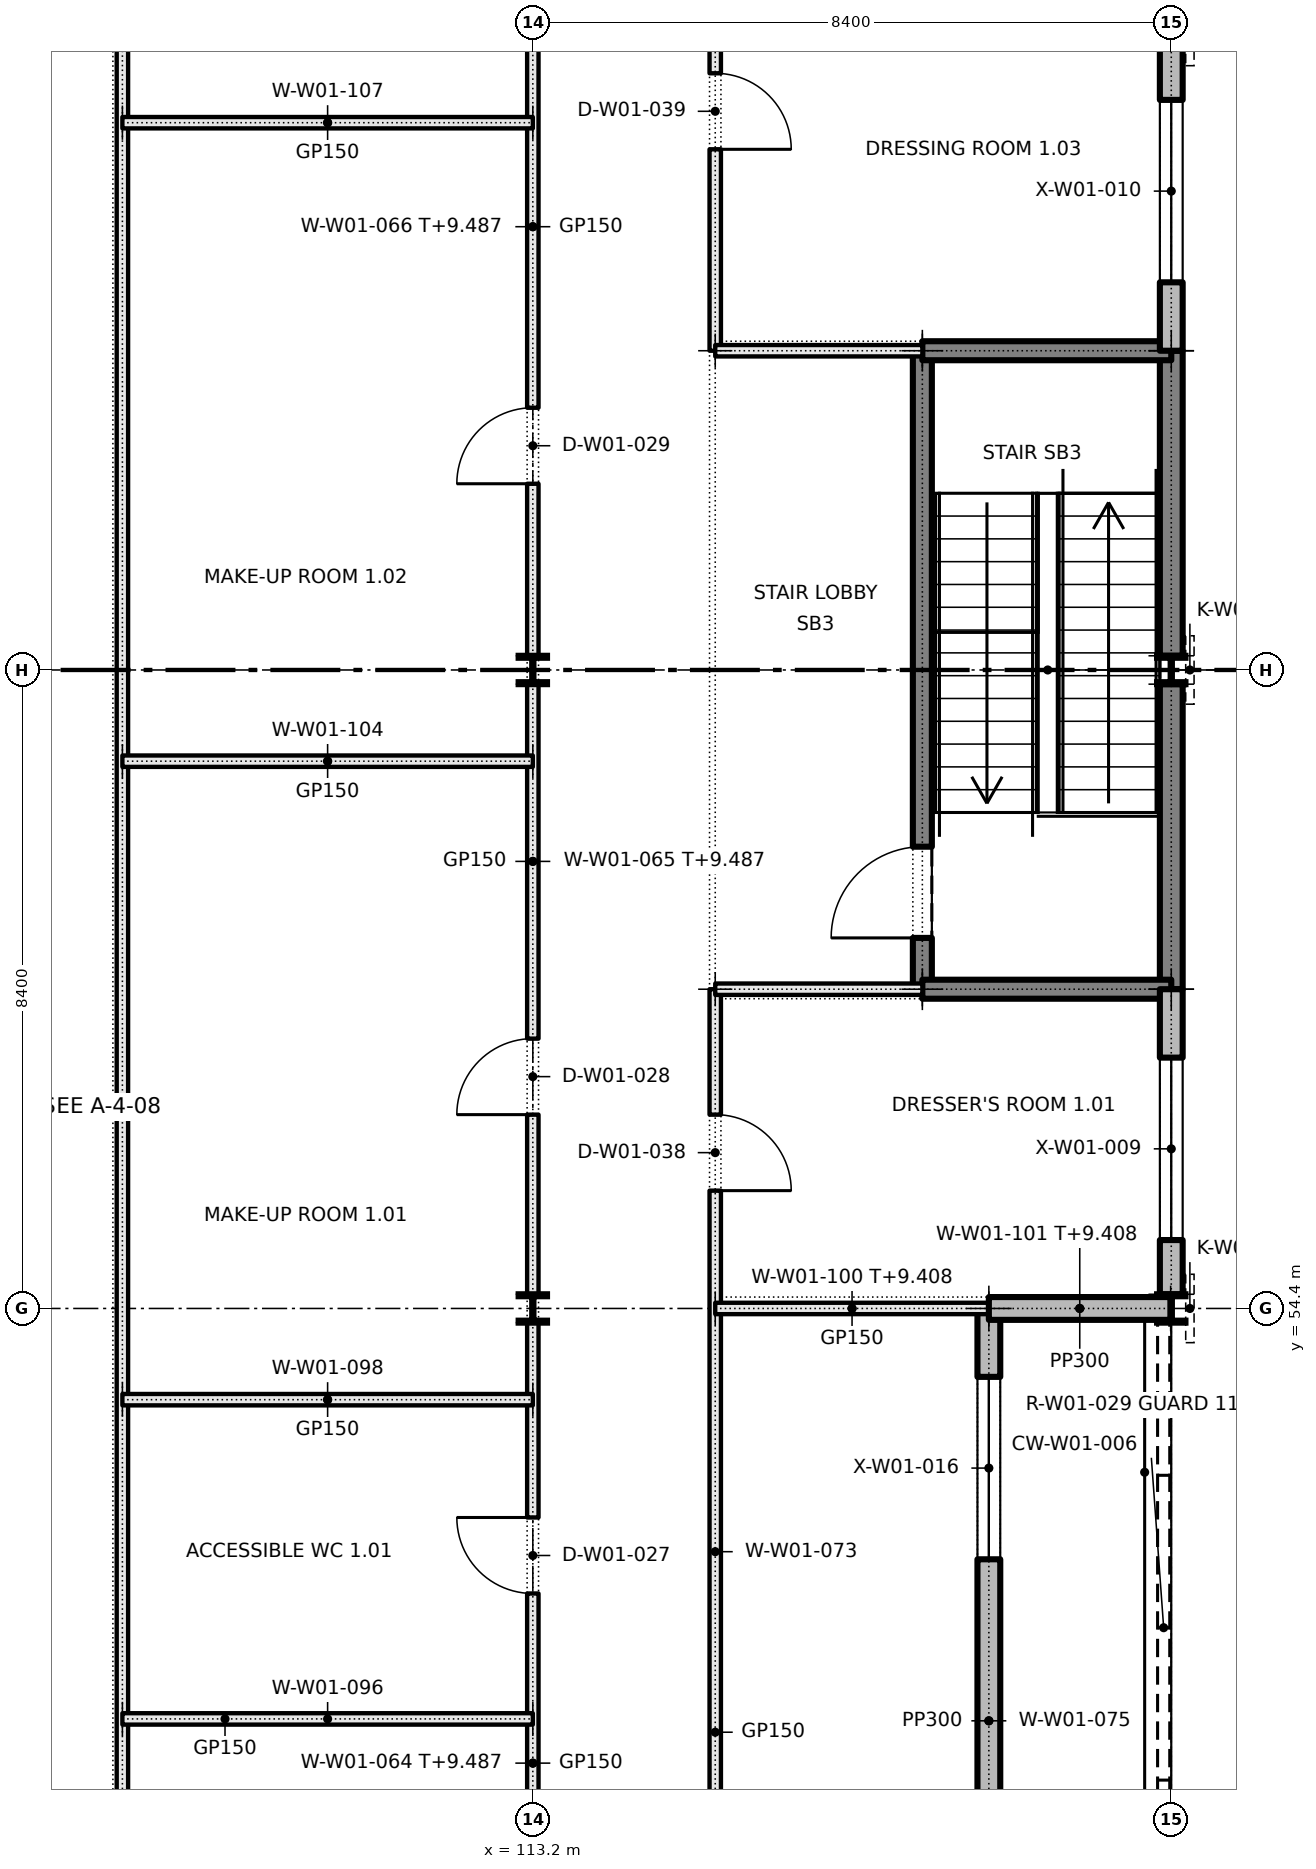
"""IFC4 building model, lengths in metres.
Left out: names, types, materials, properties, quantities, classifications, styles, units other than length and angle.
Written with IfcOpenShell. Run it as: python <this file> out.ifc"""

import sys

from ifc_helpers import new_model, si_unit, direction, frame, frame_2d, origin, origin_2d, place, context, subcontext, project, spatial, rectangle, i_section, extrude, element, fill, save


model = new_model("IFC4")
c1 = context("Model", 3, precision=1e-05, world=origin(), true_north=direction((0.0, 1.0)))
c2 = subcontext(c1, "Body", "Model", "MODEL_VIEW")
j1 = project(units=[si_unit("LENGTHUNIT", "METRE"), si_unit("PLANEANGLEUNIT", "RADIAN")], contexts=[c1])
p1 = place(None, origin())
s1 = spatial("IfcSite", under=j1, at=p1, CompositionType="ELEMENT")
p2 = place(p1, origin())
s2 = spatial("IfcBuilding", under=s1, at=p2, CompositionType="ELEMENT")
p3 = place(p2, frame((0.0, 0.0, 5.4)))
s3 = spatial("IfcBuildingStorey", under=s2, at=p3, CompositionType="ELEMENT", Elevation=5.4)
for number, where, z_axis, x_axis in (
    (1, (113.2, 54.4, 0.0), (0.0, 0.0, 1.0), (1.0, 0.0, 0.0)),
    (2, (113.2, 62.8, 0.0), (0.0, 0.0, 1.0), (1.0, 0.0, 0.0)),
    (3, (121.6, 54.4, 0.0), (0.0, 0.0, 1.0), (1.0, 0.0, 0.0)),
    (4, (121.6, 62.8, 0.0), (0.0, 0.0, 1.0), (1.0, 0.0, 0.0)),
):
    element("IfcColumn", number, at=place(p3, frame(where, z_axis=z_axis, x_axis=x_axis)), inside=s3, PredefinedType="COLUMN", context=c2, shape_type="SweptSolid", body=[
        extrude(i_section(OverallWidth=0.373, OverallDepth=0.373, WebThickness=0.016, FlangeThickness=0.026, FilletRadius=0.015, at=origin_2d()), origin(), (0.0, 0.0, 1.0), 4.8),
    ])
p4 = place(p3, frame((118.325, 58.6, 0.0), z_axis=(0.0, 0.0, 1.0), x_axis=(0.0, 1.0, 0.0)))
e5 = element("IfcWall", 5, at=p4, inside=s3, PredefinedType="SHEAR", context=c2, shape_type="SweptSolid", body=[
    extrude(rectangle(XDim=8.4, YDim=0.25, at=frame_2d((4.2, 0.0))), origin(), (0.0, 0.0, 1.0), 4.8),
])
p5 = place(p4, frame((0.675, 0.0, 0.0)))
e6 = element("IfcOpeningElement", 6, at=p5, cuts=e5, PredefinedType="OPENING", context=c2, shape_type="SweptSolid", body=[
    extrude(rectangle(XDim=1.2, YDim=2.1, at=frame_2d((0.6, 1.05))), frame((0.0, 0.135, 0.0), z_axis=(0.0, -1.0, 0.0), x_axis=(1.0, 0.0, 0.0)), (0.0, 0.0, 1.0), 0.27),
])
p6 = place(p3, frame((121.6, 58.6, 0.0), z_axis=(0.0, 0.0, 1.0), x_axis=(0.0, 1.0, 0.0)))
e7 = element("IfcWall", 7, at=p6, inside=s3, PredefinedType="SHEAR", context=c2, shape_type="SweptSolid", body=[
    extrude(rectangle(XDim=4.013, YDim=0.3, at=frame_2d((2.007, 0.0))), origin(), (0.0, 0.0, 1.0), 4.8),
])
p7 = place(p3, frame((121.6, 62.987, 0.0), z_axis=(0.0, 0.0, 1.0), x_axis=(0.0, 1.0, 0.0)))
e8 = element("IfcWall", 8, at=p7, inside=s3, PredefinedType="SHEAR", context=c2, shape_type="SweptSolid", body=[
    extrude(rectangle(XDim=4.013, YDim=0.3, at=frame_2d((2.007, 0.0))), origin(), (0.0, 0.0, 1.0), 4.8),
])
for number, where, z_axis, x_axis in (
    (9, (118.325, 58.6, 0.0), (0.0, 0.0, 1.0), (1.0, 0.0, 0.0)),
    (10, (118.325, 67.0, 0.0), (0.0, 0.0, 1.0), (1.0, 0.0, 0.0)),
):
    element("IfcWall", number, at=place(p3, frame(where, z_axis=z_axis, x_axis=x_axis)), inside=s3, PredefinedType="SHEAR", context=c2, shape_type="SweptSolid", body=[
        extrude(rectangle(XDim=3.275, YDim=0.25, at=frame_2d((1.638, 0.0))), origin(), (0.0, 0.0, 1.0), 4.8),
    ])
p8 = place(p3, frame((121.6, 54.587, 0.0), z_axis=(0.0, 0.0, 1.0), x_axis=(0.0, 1.0, 0.0)))
e11 = element("IfcWall", 11, at=p8, inside=s3, PredefinedType="SOLIDWALL", context=c2, shape_type="SweptSolid", body=[
    extrude(rectangle(XDim=4.013, YDim=0.3, at=frame_2d((2.007, 0.0))), origin(), (0.0, 0.0, 1.0), 4.087),
])
p9 = place(p8, frame((0.713, 0.0, 0.95)))
e12 = element("IfcOpeningElement", 12, at=p9, cuts=e11, PredefinedType="OPENING", context=c2, shape_type="SweptSolid", body=[
    extrude(rectangle(XDim=2.4, YDim=1.8, at=frame_2d((1.2, 0.9))), frame((0.0, 0.16, 0.0), z_axis=(0.0, -1.0, 0.0), x_axis=(1.0, 0.0, 0.0)), (0.0, 0.0, 1.0), 0.32),
])
p10 = place(p3, frame((121.6, 67.0, 0.0), z_axis=(0.0, 0.0, 1.0), x_axis=(0.0, 1.0, 0.0)))
e13 = element("IfcWall", 13, at=p10, inside=s3, PredefinedType="SOLIDWALL", context=c2, shape_type="SweptSolid", body=[
    extrude(rectangle(XDim=4.013, YDim=0.3, at=frame_2d((2.007, 0.0))), origin(), (0.0, 0.0, 1.0), 4.087),
])
p11 = place(p10, frame((0.9, 0.0, 0.95)))
e14 = element("IfcOpeningElement", 14, at=p11, cuts=e13, PredefinedType="OPENING", context=c2, shape_type="SweptSolid", body=[
    extrude(rectangle(XDim=2.4, YDim=1.8, at=frame_2d((1.2, 0.9))), frame((0.0, 0.16, 0.0), z_axis=(0.0, -1.0, 0.0), x_axis=(1.0, 0.0, 0.0)), (0.0, 0.0, 1.0), 0.32),
])
p12 = place(p3, frame((107.8, 36.4, 0.0), z_axis=(0.0, 0.0, 1.0), x_axis=(0.0, 1.0, 0.0)))
e15 = element("IfcWall", 15, at=p12, inside=s3, PredefinedType="PARTITIONING", context=c2, shape_type="SweptSolid", body=[
    extrude(rectangle(XDim=42.0, YDim=0.15, at=frame_2d((21.0, 0.0))), origin(), (0.0, 0.0, 1.0), 4.8),
])
p13 = place(p3, frame((113.2, 46.187, 0.0), z_axis=(0.0, 0.0, 1.0), x_axis=(0.0, 1.0, 0.0)))
e16 = element("IfcWall", 16, at=p13, inside=s3, PredefinedType="PARTITIONING", context=c2, shape_type="SweptSolid", body=[
    extrude(rectangle(XDim=8.027, YDim=0.15, at=frame_2d((4.013, 0.0))), origin(), (0.0, 0.0, 1.0), 4.087),
])
p14 = place(p13, frame((4.463, 0.0, 0.0)))
e17 = element("IfcOpeningElement", 17, at=p14, cuts=e16, PredefinedType="OPENING", context=c2, shape_type="SweptSolid", body=[
    extrude(rectangle(XDim=1.0, YDim=2.1, at=frame_2d((0.5, 1.05))), frame((0.0, 0.085, 0.0), z_axis=(0.0, -1.0, 0.0), x_axis=(1.0, 0.0, 0.0)), (0.0, 0.0, 1.0), 0.17),
])
p15 = place(p3, frame((113.2, 54.587, 0.0), z_axis=(0.0, 0.0, 1.0), x_axis=(0.0, 1.0, 0.0)))
e18 = element("IfcWall", 18, at=p15, inside=s3, PredefinedType="PARTITIONING", context=c2, shape_type="SweptSolid", body=[
    extrude(rectangle(XDim=8.027, YDim=0.15, at=frame_2d((4.013, 0.0))), origin(), (0.0, 0.0, 1.0), 4.087),
])
p16 = place(p15, frame((2.363, 0.0, 0.0)))
e19 = element("IfcOpeningElement", 19, at=p16, cuts=e18, PredefinedType="OPENING", context=c2, shape_type="SweptSolid", body=[
    extrude(rectangle(XDim=1.0, YDim=2.1, at=frame_2d((0.5, 1.05))), frame((0.0, 0.085, 0.0), z_axis=(0.0, -1.0, 0.0), x_axis=(1.0, 0.0, 0.0)), (0.0, 0.0, 1.0), 0.17),
])
p17 = place(p3, frame((113.2, 62.987, 0.0), z_axis=(0.0, 0.0, 1.0), x_axis=(0.0, 1.0, 0.0)))
e20 = element("IfcWall", 20, at=p17, inside=s3, PredefinedType="PARTITIONING", context=c2, shape_type="SweptSolid", body=[
    extrude(rectangle(XDim=8.027, YDim=0.15, at=frame_2d((4.013, 0.0))), origin(), (0.0, 0.0, 1.0), 4.087),
])
p18 = place(p17, frame((2.263, 0.0, 0.0)))
e21 = element("IfcOpeningElement", 21, at=p18, cuts=e20, PredefinedType="OPENING", context=c2, shape_type="SweptSolid", body=[
    extrude(rectangle(XDim=1.0, YDim=2.1, at=frame_2d((0.5, 1.05))), frame((0.0, 0.085, 0.0), z_axis=(0.0, -1.0, 0.0), x_axis=(1.0, 0.0, 0.0)), (0.0, 0.0, 1.0), 0.17),
])
p19 = place(p3, frame((115.6, 37.6, 0.0), z_axis=(0.0, 0.0, 1.0), x_axis=(0.0, 1.0, 0.0)))
e22 = element("IfcWall", 22, at=p19, inside=s3, PredefinedType="PARTITIONING", context=c2, shape_type="SweptSolid", body=[
    extrude(rectangle(XDim=21.0, YDim=0.15, at=frame_2d((10.5, 0.0))), origin(), (0.0, 0.0, 1.0), 4.8),
])
p20 = place(p19, frame((7.85, 0.0, 0.0)))
e23 = element("IfcOpeningElement", 23, at=p20, cuts=e22, PredefinedType="OPENING", context=c2, shape_type="SweptSolid", body=[
    extrude(rectangle(XDim=1.0, YDim=2.1, at=frame_2d((0.5, 1.05))), frame((0.0, 0.085, 0.0), z_axis=(0.0, -1.0, 0.0), x_axis=(1.0, 0.0, 0.0)), (0.0, 0.0, 1.0), 0.17),
])
p21 = place(p19, frame((18.35, 0.0, 0.0)))
e24 = element("IfcOpeningElement", 24, at=p21, cuts=e22, PredefinedType="OPENING", context=c2, shape_type="SweptSolid", body=[
    extrude(rectangle(XDim=1.0, YDim=2.1, at=frame_2d((0.5, 1.05))), frame((0.0, 0.085, 0.0), z_axis=(0.0, -1.0, 0.0), x_axis=(1.0, 0.0, 0.0)), (0.0, 0.0, 1.0), 0.17),
])
p22 = place(p3, frame((115.6, 67.0, 0.0), z_axis=(0.0, 0.0, 1.0), x_axis=(0.0, 1.0, 0.0)))
e25 = element("IfcWall", 25, at=p22, inside=s3, PredefinedType="PARTITIONING", context=c2, shape_type="SweptSolid", body=[
    extrude(rectangle(XDim=21.0, YDim=0.15, at=frame_2d((10.5, 0.0))), origin(), (0.0, 0.0, 1.0), 4.8),
])
p23 = place(p22, frame((2.65, 0.0, 0.0)))
e26 = element("IfcOpeningElement", 26, at=p23, cuts=e25, PredefinedType="OPENING", context=c2, shape_type="SweptSolid", body=[
    extrude(rectangle(XDim=1.0, YDim=2.1, at=frame_2d((0.5, 1.05))), frame((0.0, 0.085, 0.0), z_axis=(0.0, -1.0, 0.0), x_axis=(1.0, 0.0, 0.0)), (0.0, 0.0, 1.0), 0.17),
])
p24 = place(p22, frame((11.05, 0.0, 0.0)))
e27 = element("IfcOpeningElement", 27, at=p24, cuts=e25, PredefinedType="OPENING", context=c2, shape_type="SweptSolid", body=[
    extrude(rectangle(XDim=1.0, YDim=2.1, at=frame_2d((0.5, 1.05))), frame((0.0, 0.085, 0.0), z_axis=(0.0, -1.0, 0.0), x_axis=(1.0, 0.0, 0.0)), (0.0, 0.0, 1.0), 0.17),
])
p25 = place(p22, frame((18.45, 0.0, 0.0)))
e28 = element("IfcOpeningElement", 28, at=p25, cuts=e25, PredefinedType="OPENING", context=c2, shape_type="SweptSolid", body=[
    extrude(rectangle(XDim=1.0, YDim=2.1, at=frame_2d((0.5, 1.05))), frame((0.0, 0.085, 0.0), z_axis=(0.0, -1.0, 0.0), x_axis=(1.0, 0.0, 0.0)), (0.0, 0.0, 1.0), 0.17),
])
p26 = place(p3, frame((119.2, 37.6, 0.0), z_axis=(0.0, 0.0, 1.0), x_axis=(0.0, 1.0, 0.0)))
e29 = element("IfcWall", 29, at=p26, inside=s3, PredefinedType="SOLIDWALL", context=c2, shape_type="SweptSolid", body=[
    extrude(rectangle(XDim=16.8, YDim=0.3, at=frame_2d((8.4, 0.0))), origin(), (0.0, 0.0, 1.0), 4.8),
])
p27 = place(p26, frame((7.45, 0.0, 0.0)))
e30 = element("IfcOpeningElement", 30, at=p27, cuts=e29, PredefinedType="OPENING", context=c2, shape_type="SweptSolid", body=[
    extrude(rectangle(XDim=1.8, YDim=2.1, at=frame_2d((0.9, 1.05))), frame((0.0, 0.16, 0.0), z_axis=(0.0, -1.0, 0.0), x_axis=(1.0, 0.0, 0.0)), (0.0, 0.0, 1.0), 0.32),
])
p28 = place(p26, frame((0.9, 0.0, 0.95)))
e31 = element("IfcOpeningElement", 31, at=p28, cuts=e29, PredefinedType="OPENING", context=c2, shape_type="SweptSolid", body=[
    extrude(rectangle(XDim=2.4, YDim=1.8, at=frame_2d((1.2, 0.9))), frame((0.0, 0.16, 0.0), z_axis=(0.0, -1.0, 0.0), x_axis=(1.0, 0.0, 0.0)), (0.0, 0.0, 1.0), 0.32),
])
p29 = place(p26, frame((13.5, 0.0, 0.95)))
e32 = element("IfcOpeningElement", 32, at=p29, cuts=e29, PredefinedType="OPENING", context=c2, shape_type="SweptSolid", body=[
    extrude(rectangle(XDim=2.4, YDim=1.8, at=frame_2d((1.2, 0.9))), frame((0.0, 0.16, 0.0), z_axis=(0.0, -1.0, 0.0), x_axis=(1.0, 0.0, 0.0)), (0.0, 0.0, 1.0), 0.32),
])
for number, where, z_axis, x_axis in (
    (33, (107.8, 49.0, 0.0), (0.0, 0.0, 1.0), (1.0, 0.0, 0.0)),
    (34, (107.8, 53.2, 0.0), (0.0, 0.0, 1.0), (1.0, 0.0, 0.0)),
):
    element("IfcWall", number, at=place(p3, frame(where, z_axis=z_axis, x_axis=x_axis)), inside=s3, PredefinedType="PARTITIONING", context=c2, shape_type="SweptSolid", body=[
        extrude(rectangle(XDim=5.4, YDim=0.15, at=frame_2d((2.7, 0.0))), origin(), (0.0, 0.0, 1.0), 4.8),
    ])
p30 = place(p3, frame((115.6, 54.4, 0.0), z_axis=(0.0, 0.0, 1.0), x_axis=(1.0, 0.0, 0.0)))
e35 = element("IfcWall", 35, at=p30, inside=s3, PredefinedType="PARTITIONING", context=c2, shape_type="SweptSolid", body=[
    extrude(rectangle(XDim=3.6, YDim=0.15, at=frame_2d((1.8, 0.0))), origin(), (0.0, 0.0, 1.0), 4.008),
])
p31 = place(p3, frame((119.2, 54.4, 0.0), z_axis=(0.0, 0.0, 1.0), x_axis=(1.0, 0.0, 0.0)))
e36 = element("IfcWall", 36, at=p31, inside=s3, PredefinedType="SOLIDWALL", context=c2, shape_type="SweptSolid", body=[
    extrude(rectangle(XDim=2.392, YDim=0.3, at=frame_2d((1.196, 0.0))), origin(), (0.0, 0.0, 1.0), 4.008),
])
p32 = place(p3, frame((115.6, 58.6, 0.0), z_axis=(0.0, 0.0, 1.0), x_axis=(1.0, 0.0, 0.0)))
e37 = element("IfcWall", 37, at=p32, inside=s3, PredefinedType="PARTITIONING", context=c2, shape_type="SweptSolid", body=[
    extrude(rectangle(XDim=2.725, YDim=0.15, at=frame_2d((1.362, 0.0))), origin(), (0.0, 0.0, 1.0), 4.8),
])
p33 = place(p3, frame((107.8, 61.6, 0.0), z_axis=(0.0, 0.0, 1.0), x_axis=(1.0, 0.0, 0.0)))
e38 = element("IfcWall", 38, at=p33, inside=s3, PredefinedType="PARTITIONING", context=c2, shape_type="SweptSolid", body=[
    extrude(rectangle(XDim=5.4, YDim=0.15, at=frame_2d((2.7, 0.0))), origin(), (0.0, 0.0, 1.0), 4.8),
])
p34 = place(p3, frame((115.6, 67.0, 0.0), z_axis=(0.0, 0.0, 1.0), x_axis=(1.0, 0.0, 0.0)))
e39 = element("IfcWall", 39, at=p34, inside=s3, PredefinedType="PARTITIONING", context=c2, shape_type="SweptSolid", body=[
    extrude(rectangle(XDim=2.725, YDim=0.15, at=frame_2d((1.362, 0.0))), origin(), (0.0, 0.0, 1.0), 4.8),
])
p35 = place(p3, frame((107.8, 70.0, 0.0), z_axis=(0.0, 0.0, 1.0), x_axis=(1.0, 0.0, 0.0)))
e40 = element("IfcWall", 40, at=p35, inside=s3, PredefinedType="PARTITIONING", context=c2, shape_type="SweptSolid", body=[
    extrude(rectangle(XDim=5.4, YDim=0.15, at=frame_2d((2.7, 0.0))), origin(), (0.0, 0.0, 1.0), 4.8),
])
p36 = place(p9, origin())
e41 = element("IfcWindow", 41, at=p36, inside=s3, PartitioningType="DOUBLE_PANEL_VERTICAL", PredefinedType="WINDOW", context=c2, shape_type="SweptSolid", body=[
    extrude(rectangle(XDim=2.4, YDim=1.8, at=frame_2d((1.2, 0.9))), frame((0.0, 0.03, 0.0), z_axis=(0.0, -1.0, 0.0), x_axis=(1.0, 0.0, 0.0)), (0.0, 0.0, 1.0), 0.06),
])
fill(e12, e41)
p37 = place(p11, origin())
e42 = element("IfcWindow", 42, at=p37, inside=s3, PartitioningType="DOUBLE_PANEL_VERTICAL", PredefinedType="WINDOW", context=c2, shape_type="SweptSolid", body=[
    extrude(rectangle(XDim=2.4, YDim=1.8, at=frame_2d((1.2, 0.9))), frame((0.0, 0.03, 0.0), z_axis=(0.0, -1.0, 0.0), x_axis=(1.0, 0.0, 0.0)), (0.0, 0.0, 1.0), 0.06),
])
fill(e14, e42)
p38 = place(p5, origin())
e43 = element("IfcDoor", 43, at=p38, inside=s3, OperationType="SINGLE_SWING_LEFT", PredefinedType="DOOR", context=c2, shape_type="SweptSolid", body=[
    extrude(rectangle(XDim=1.2, YDim=2.1, at=frame_2d((0.6, 1.05))), frame((0.0, 0.025, 0.0), z_axis=(0.0, -1.0, 0.0), x_axis=(1.0, 0.0, 0.0)), (0.0, 0.0, 1.0), 0.05),
])
fill(e6, e43)
p39 = place(p14, origin())
e44 = element("IfcDoor", 44, at=p39, inside=s3, OperationType="SINGLE_SWING_RIGHT", PredefinedType="DOOR", context=c2, shape_type="SweptSolid", body=[
    extrude(rectangle(XDim=1.0, YDim=2.1, at=frame_2d((0.5, 1.05))), frame((0.0, 0.025, 0.0), z_axis=(0.0, -1.0, 0.0), x_axis=(1.0, 0.0, 0.0)), (0.0, 0.0, 1.0), 0.05),
])
fill(e17, e44)
p40 = place(p16, origin())
e45 = element("IfcDoor", 45, at=p40, inside=s3, OperationType="SINGLE_SWING_LEFT", PredefinedType="DOOR", context=c2, shape_type="SweptSolid", body=[
    extrude(rectangle(XDim=1.0, YDim=2.1, at=frame_2d((0.5, 1.05))), frame((0.0, 0.025, 0.0), z_axis=(0.0, -1.0, 0.0), x_axis=(1.0, 0.0, 0.0)), (0.0, 0.0, 1.0), 0.05),
])
fill(e19, e45)
p41 = place(p18, origin())
e46 = element("IfcDoor", 46, at=p41, inside=s3, OperationType="SINGLE_SWING_LEFT", PredefinedType="DOOR", context=c2, shape_type="SweptSolid", body=[
    extrude(rectangle(XDim=1.0, YDim=2.1, at=frame_2d((0.5, 1.05))), frame((0.0, 0.025, 0.0), z_axis=(0.0, -1.0, 0.0), x_axis=(1.0, 0.0, 0.0)), (0.0, 0.0, 1.0), 0.05),
])
fill(e21, e46)
p42 = place(p21, frame((1.0, 0.0, 0.0), z_axis=(0.0, 0.0, 1.0), x_axis=(-1.0, 0.0, 0.0)))
e47 = element("IfcDoor", 47, at=p42, inside=s3, OperationType="SINGLE_SWING_RIGHT", PredefinedType="DOOR", context=c2, shape_type="SweptSolid", body=[
    extrude(rectangle(XDim=1.0, YDim=2.1, at=frame_2d((0.5, 1.05))), frame((0.0, 0.025, 0.0), z_axis=(0.0, -1.0, 0.0), x_axis=(1.0, 0.0, 0.0)), (0.0, 0.0, 1.0), 0.05),
])
fill(e24, e47)
p43 = place(p23, frame((1.0, 0.0, 0.0), z_axis=(0.0, 0.0, 1.0), x_axis=(-1.0, 0.0, 0.0)))
e48 = element("IfcDoor", 48, at=p43, inside=s3, OperationType="SINGLE_SWING_RIGHT", PredefinedType="DOOR", context=c2, shape_type="SweptSolid", body=[
    extrude(rectangle(XDim=1.0, YDim=2.1, at=frame_2d((0.5, 1.05))), frame((0.0, 0.025, 0.0), z_axis=(0.0, -1.0, 0.0), x_axis=(1.0, 0.0, 0.0)), (0.0, 0.0, 1.0), 0.05),
])
fill(e26, e48)
p44 = place(p29, origin())
e49 = element("IfcWindow", 49, at=p44, inside=s3, PartitioningType="DOUBLE_PANEL_VERTICAL", PredefinedType="WINDOW", context=c2, shape_type="SweptSolid", body=[
    extrude(rectangle(XDim=2.4, YDim=1.8, at=frame_2d((1.2, 0.9))), frame((0.0, 0.03, 0.0), z_axis=(0.0, -1.0, 0.0), x_axis=(1.0, 0.0, 0.0)), (0.0, 0.0, 1.0), 0.06),
])
fill(e32, e49)
save(model, sys.argv[1])
